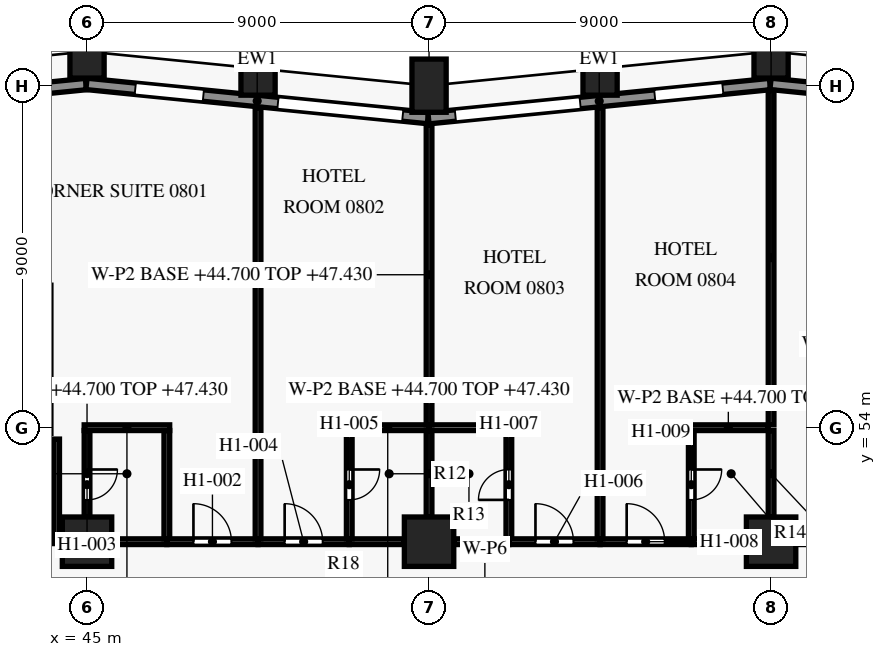
"""IFC4 building model, lengths in metres.
Left out: names, types, materials, properties, quantities, classifications, styles, units other than length and angle.
Written with IfcOpenShell. Run it as: python <this file> out.ifc"""

import sys

from ifc_helpers import new_model, si_unit, direction, frame, frame_2d, origin, origin_2d, place, context, subcontext, project, spatial, rectangle, extrude, element, fill, save


model = new_model("IFC4")
c1 = context("Model", 3, precision=1e-05, world=origin(), true_north=direction((0.0, 1.0)))
c2 = subcontext(c1, "Body", "Model", "MODEL_VIEW")
j1 = project(units=[si_unit("LENGTHUNIT", "METRE"), si_unit("PLANEANGLEUNIT", "RADIAN")], contexts=[c1])
p1 = place(None, origin())
s1 = spatial("IfcSite", under=j1, at=p1, CompositionType="ELEMENT")
p2 = place(p1, origin())
s2 = spatial("IfcBuilding", under=s1, at=p2, CompositionType="ELEMENT")
p3 = place(p2, frame((0.0, 0.0, 44.7)))
s3 = spatial("IfcBuildingStorey", under=s2, at=p3, CompositionType="ELEMENT", Elevation=44.7)
for number, where, z_axis, x_axis in (
    (1, (63.0, 63.9, 0.0), (0.0, 0.0, 1.0), (-1.0, 0.0, 0.0)),
    (2, (58.5, 63.45, 0.0), (0.0, 0.0, 1.0), (-0.995, -0.1, 0.0)),
    (3, (54.0, 63.0, 0.0), (0.0, 0.0, 1.0), (-1.0, 0.0, 0.0)),
    (4, (49.5, 63.45, 0.0), (0.0, 0.0, 1.0), (-0.995, 0.1, 0.0)),
    (5, (45.0, 63.9, 0.0), (0.0, 0.0, 1.0), (-1.0, 0.0, 0.0)),
):
    element("IfcColumn", number, at=place(p3, frame(where, z_axis=z_axis, x_axis=x_axis)), inside=s3, PredefinedType="COLUMN", context=c2, shape_type="SweptSolid", body=[
        extrude(rectangle(XDim=0.9, YDim=1.4, at=origin_2d()), origin(), (0.0, 0.0, 1.0), 3.6),
    ])
for number, where, z_axis, x_axis in (
    (6, (45.0, 51.0, 0.0), (0.0, 0.0, 1.0), (1.0, 0.0, 0.0)),
    (7, (54.0, 51.0, 0.0), (0.0, 0.0, 1.0), (1.0, 0.0, 0.0)),
    (8, (63.0, 51.0, 0.0), (0.0, 0.0, 1.0), (1.0, 0.0, 0.0)),
):
    element("IfcColumn", number, at=place(p3, frame(where, z_axis=z_axis, x_axis=x_axis)), inside=s3, PredefinedType="COLUMN", context=c2, shape_type="SweptSolid", body=[
        extrude(rectangle(XDim=1.3, YDim=1.3, at=origin_2d()), origin(), (0.0, 0.0, 1.0), 3.6),
    ])
p4 = place(p3, frame((62.985, 63.047, 0.0), z_axis=(0.0, 0.0, 1.0), x_axis=(0.995031712439, -0.099558481511, 0.0)))
e9 = element("IfcWall", 9, at=p4, inside=s3, PredefinedType="SOLIDWALL", context=c2, shape_type="SweptSolid", body=[
    extrude(rectangle(XDim=3.531, YDim=0.3, at=frame_2d((1.766, 0.0))), origin(), (0.0, 0.0, 1.0), 2.95),
])
p5 = place(p4, frame((1.291, 0.0, 0.75)))
e10 = element("IfcOpeningElement", 10, at=p5, cuts=e9, PredefinedType="OPENING", context=c2, shape_type="SweptSolid", body=[
    extrude(rectangle(XDim=1.8, YDim=1.8, at=frame_2d((0.9, 0.9))), frame((0.0, 0.16, 0.0), z_axis=(0.0, -1.0, 0.0), x_axis=(1.0, 0.0, 0.0)), (0.0, 0.0, 1.0), 0.32),
])
p6 = place(p3, frame((53.985, 62.144, 0.0), z_axis=(0.0, 0.0, 1.0), x_axis=(0.995037993253, 0.099495688264, 0.0)))
e11 = element("IfcWall", 11, at=p6, inside=s3, PredefinedType="SOLIDWALL", context=c2, shape_type="SweptSolid", body=[
    extrude(rectangle(XDim=9.03, YDim=0.3, at=frame_2d((4.515, 0.0))), origin(), (0.0, 0.0, 1.0), 2.95),
])
p7 = place(p6, frame((0.711, 0.0, 0.15)))
e12 = element("IfcOpeningElement", 12, at=p7, cuts=e11, PredefinedType="OPENING", context=c2, shape_type="SweptSolid", body=[
    extrude(rectangle(XDim=3.3, YDim=2.4, at=frame_2d((1.65, 1.2))), frame((0.0, 0.16, 0.0), z_axis=(0.0, -1.0, 0.0), x_axis=(1.0, 0.0, 0.0)), (0.0, 0.0, 1.0), 0.32),
])
p8 = place(p6, frame((5.984, 0.0, 0.75)))
e13 = element("IfcOpeningElement", 13, at=p8, cuts=e11, PredefinedType="OPENING", context=c2, shape_type="SweptSolid", body=[
    extrude(rectangle(XDim=1.8, YDim=1.8, at=frame_2d((0.9, 0.9))), frame((0.0, 0.16, 0.0), z_axis=(0.0, -1.0, 0.0), x_axis=(1.0, 0.0, 0.0)), (0.0, 0.0, 1.0), 0.32),
])
p9 = place(p3, frame((44.985, 63.047, 0.0), z_axis=(0.0, 0.0, 1.0), x_axis=(0.995035316196, -0.099522457379, 0.0)))
e14 = element("IfcWall", 14, at=p9, inside=s3, PredefinedType="SOLIDWALL", context=c2, shape_type="SweptSolid", body=[
    extrude(rectangle(XDim=9.03, YDim=0.3, at=frame_2d((4.515, 0.0))), origin(), (0.0, 0.0, 1.0), 2.95),
])
p10 = place(p9, frame((1.291, 0.0, 0.75)))
e15 = element("IfcOpeningElement", 15, at=p10, cuts=e14, PredefinedType="OPENING", context=c2, shape_type="SweptSolid", body=[
    extrude(rectangle(XDim=1.8, YDim=1.8, at=frame_2d((0.9, 0.9))), frame((0.0, 0.16, 0.0), z_axis=(0.0, -1.0, 0.0), x_axis=(1.0, 0.0, 0.0)), (0.0, 0.0, 1.0), 0.32),
])
p11 = place(p9, frame((5.064, 0.0, 0.15)))
e16 = element("IfcOpeningElement", 16, at=p11, cuts=e14, PredefinedType="OPENING", context=c2, shape_type="SweptSolid", body=[
    extrude(rectangle(XDim=3.3, YDim=2.4, at=frame_2d((1.65, 1.2))), frame((0.0, 0.16, 0.0), z_axis=(0.0, -1.0, 0.0), x_axis=(1.0, 0.0, 0.0)), (0.0, 0.0, 1.0), 0.32),
])
p12 = place(p3, frame((35.985, 62.144, 0.0), z_axis=(0.0, 0.0, 1.0), x_axis=(0.995037993253, 0.099495688264, 0.0)))
e17 = element("IfcWall", 17, at=p12, inside=s3, PredefinedType="SOLIDWALL", context=c2, shape_type="SweptSolid", body=[
    extrude(rectangle(XDim=9.03, YDim=0.3, at=frame_2d((4.515, 0.0))), origin(), (0.0, 0.0, 1.0), 2.95),
])
p13 = place(p12, frame((0.711, 0.0, 0.15)))
e18 = element("IfcOpeningElement", 18, at=p13, cuts=e17, PredefinedType="OPENING", context=c2, shape_type="SweptSolid", body=[
    extrude(rectangle(XDim=3.3, YDim=2.4, at=frame_2d((1.65, 1.2))), frame((0.0, 0.16, 0.0), z_axis=(0.0, -1.0, 0.0), x_axis=(1.0, 0.0, 0.0)), (0.0, 0.0, 1.0), 0.32),
])
p14 = place(p12, frame((5.984, 0.0, 0.75)))
e19 = element("IfcOpeningElement", 19, at=p14, cuts=e17, PredefinedType="OPENING", context=c2, shape_type="SweptSolid", body=[
    extrude(rectangle(XDim=1.8, YDim=1.8, at=frame_2d((0.9, 0.9))), frame((0.0, 0.16, 0.0), z_axis=(0.0, -1.0, 0.0), x_axis=(1.0, 0.0, 0.0)), (0.0, 0.0, 1.0), 0.32),
])
p15 = place(p3, frame((44.33, 51.0, 0.0), z_axis=(0.0, 0.0, 1.0), x_axis=(-1.0, 0.0, 0.0)))
e20 = element("IfcWall", 20, at=p15, inside=s3, PredefinedType="PARTITIONING", context=c2, shape_type="SweptSolid", body=[
    extrude(rectangle(XDim=3.83, YDim=0.1, at=frame_2d((1.915, 0.0))), origin(), (0.0, 0.0, 1.0), 2.58),
])
p16 = place(p3, frame((45.655, 51.0, 0.0), z_axis=(0.0, 0.0, 1.0), x_axis=(1.0, 0.0, 0.0)))
e21 = element("IfcWall", 21, at=p16, inside=s3, PredefinedType="PARTITIONING", context=c2, shape_type="SweptSolid", body=[
    extrude(rectangle(XDim=1.445, YDim=0.15, at=frame_2d((0.723, 0.0))), origin(), (0.0, 0.0, 1.0), 2.58),
])
p17 = place(p3, frame((47.1, 51.0, 0.0), z_axis=(0.0, 0.0, 1.0), x_axis=(1.0, 0.0, 0.0)))
e22 = element("IfcWall", 22, at=p17, inside=s3, PredefinedType="PARTITIONING", context=c2, shape_type="SweptSolid", body=[
    extrude(rectangle(XDim=2.4, YDim=0.15, at=frame_2d((1.2, 0.0))), origin(), (0.0, 0.0, 1.0), 2.58),
])
p18 = place(p17, frame((0.7, 0.0, 0.0)))
e23 = element("IfcOpeningElement", 23, at=p18, cuts=e22, PredefinedType="OPENING", context=c2, shape_type="SweptSolid", body=[
    extrude(rectangle(XDim=1.0, YDim=2.1, at=frame_2d((0.5, 1.05))), frame((0.0, 0.085, 0.0), z_axis=(0.0, -1.0, 0.0), x_axis=(1.0, 0.0, 0.0)), (0.0, 0.0, 1.0), 0.17),
])
p19 = place(p3, frame((49.5, 51.0, 0.0), z_axis=(0.0, 0.0, 1.0), x_axis=(1.0, 0.0, 0.0)))
e24 = element("IfcWall", 24, at=p19, inside=s3, PredefinedType="PARTITIONING", context=c2, shape_type="SweptSolid", body=[
    extrude(rectangle(XDim=2.4, YDim=0.15, at=frame_2d((1.2, 0.0))), origin(), (0.0, 0.0, 1.0), 2.58),
])
p20 = place(p19, frame((0.7, 0.0, 0.0)))
e25 = element("IfcOpeningElement", 25, at=p20, cuts=e24, PredefinedType="OPENING", context=c2, shape_type="SweptSolid", body=[
    extrude(rectangle(XDim=1.0, YDim=2.1, at=frame_2d((0.5, 1.05))), frame((0.0, 0.085, 0.0), z_axis=(0.0, -1.0, 0.0), x_axis=(1.0, 0.0, 0.0)), (0.0, 0.0, 1.0), 0.17),
])
for number, where, z_axis, x_axis in (
    (26, (51.9, 51.0, 0.0), (0.0, 0.0, 1.0), (1.0, 0.0, 0.0)),
    (27, (54.655, 51.0, 0.0), (0.0, 0.0, 1.0), (1.0, 0.0, 0.0)),
):
    element("IfcWall", number, at=place(p3, frame(where, z_axis=z_axis, x_axis=x_axis)), inside=s3, PredefinedType="PARTITIONING", context=c2, shape_type="SweptSolid", body=[
        extrude(rectangle(XDim=1.445, YDim=0.15, at=frame_2d((0.723, 0.0))), origin(), (0.0, 0.0, 1.0), 2.58),
    ])
p21 = place(p3, frame((56.1, 51.0, 0.0), z_axis=(0.0, 0.0, 1.0), x_axis=(1.0, 0.0, 0.0)))
e28 = element("IfcWall", 28, at=p21, inside=s3, PredefinedType="PARTITIONING", context=c2, shape_type="SweptSolid", body=[
    extrude(rectangle(XDim=2.4, YDim=0.15, at=frame_2d((1.2, 0.0))), origin(), (0.0, 0.0, 1.0), 2.58),
])
p22 = place(p21, frame((0.7, 0.0, 0.0)))
e29 = element("IfcOpeningElement", 29, at=p22, cuts=e28, PredefinedType="OPENING", context=c2, shape_type="SweptSolid", body=[
    extrude(rectangle(XDim=1.0, YDim=2.1, at=frame_2d((0.5, 1.05))), frame((0.0, 0.085, 0.0), z_axis=(0.0, -1.0, 0.0), x_axis=(1.0, 0.0, 0.0)), (0.0, 0.0, 1.0), 0.17),
])
p23 = place(p3, frame((58.5, 51.0, 0.0), z_axis=(0.0, 0.0, 1.0), x_axis=(1.0, 0.0, 0.0)))
e30 = element("IfcWall", 30, at=p23, inside=s3, PredefinedType="PARTITIONING", context=c2, shape_type="SweptSolid", body=[
    extrude(rectangle(XDim=2.4, YDim=0.15, at=frame_2d((1.2, 0.0))), origin(), (0.0, 0.0, 1.0), 2.58),
])
p24 = place(p23, frame((0.7, 0.0, 0.0)))
e31 = element("IfcOpeningElement", 31, at=p24, cuts=e30, PredefinedType="OPENING", context=c2, shape_type="SweptSolid", body=[
    extrude(rectangle(XDim=1.0, YDim=2.1, at=frame_2d((0.5, 1.05))), frame((0.0, 0.085, 0.0), z_axis=(0.0, -1.0, 0.0), x_axis=(1.0, 0.0, 0.0)), (0.0, 0.0, 1.0), 0.17),
])
p25 = place(p3, frame((60.9, 51.0, 0.0), z_axis=(0.0, 0.0, 1.0), x_axis=(1.0, 0.0, 0.0)))
e32 = element("IfcWall", 32, at=p25, inside=s3, PredefinedType="PARTITIONING", context=c2, shape_type="SweptSolid", body=[
    extrude(rectangle(XDim=1.445, YDim=0.15, at=frame_2d((0.723, 0.0))), origin(), (0.0, 0.0, 1.0), 2.58),
])
p26 = place(p3, frame((63.655, 51.0, 0.0), z_axis=(0.0, 0.0, 1.0), x_axis=(1.0, 0.0, 0.0)))
e33 = element("IfcWall", 33, at=p26, inside=s3, PredefinedType="PARTITIONING", context=c2, shape_type="SweptSolid", body=[
    extrude(rectangle(XDim=1.22, YDim=0.15, at=frame_2d((0.61, 0.0))), origin(), (0.0, 0.0, 1.0), 2.58),
])
p27 = place(p3, frame((47.1, 51.075, 0.0), z_axis=(0.0, 0.0, 1.0), x_axis=(0.0, 1.0, 0.0)))
e34 = element("IfcWall", 34, at=p27, inside=s3, PredefinedType="PARTITIONING", context=c2, shape_type="SweptSolid", body=[
    extrude(rectangle(XDim=2.85, YDim=0.15, at=frame_2d((1.425, 0.0))), origin(), (0.0, 0.0, 1.0), 2.58),
])
p28 = place(p3, frame((56.1, 51.075, 0.0), z_axis=(0.0, 0.0, 1.0), x_axis=(0.0, 1.0, 0.0)))
e35 = element("IfcWall", 35, at=p28, inside=s3, PredefinedType="PARTITIONING", context=c2, shape_type="SweptSolid", body=[
    extrude(rectangle(XDim=2.85, YDim=0.15, at=frame_2d((1.425, 0.0))), origin(), (0.0, 0.0, 1.0), 2.58),
])
p29 = place(p28, frame((1.025, 0.0, 0.0)))
e36 = element("IfcOpeningElement", 36, at=p29, cuts=e35, PredefinedType="OPENING", context=c2, shape_type="SweptSolid", body=[
    extrude(rectangle(XDim=0.8, YDim=2.1, at=frame_2d((0.4, 1.05))), frame((0.0, 0.085, 0.0), z_axis=(0.0, -1.0, 0.0), x_axis=(1.0, 0.0, 0.0)), (0.0, 0.0, 1.0), 0.17),
])
p30 = place(p3, frame((44.2, 53.7, 0.0), z_axis=(0.0, 0.0, 1.0), x_axis=(0.0, -1.0, 0.0)))
e37 = element("IfcWall", 37, at=p30, inside=s3, PredefinedType="PARTITIONING", context=c2, shape_type="SweptSolid", body=[
    extrude(rectangle(XDim=2.625, YDim=0.15, at=frame_2d((1.312, 0.0))), origin(), (0.0, 0.0, 1.0), 2.58),
])
p31 = place(p3, frame((45.0, 53.925, 0.0), z_axis=(0.0, 0.0, 1.0), x_axis=(0.0, -1.0, 0.0)))
e38 = element("IfcWall", 38, at=p31, inside=s3, PredefinedType="PARTITIONING", context=c2, shape_type="SweptSolid", body=[
    extrude(rectangle(XDim=2.27, YDim=0.15, at=frame_2d((1.135, 0.0))), origin(), (0.0, 0.0, 1.0), 2.73),
])
p32 = place(p31, frame((1.025, 0.0, 0.0)))
e39 = element("IfcOpeningElement", 39, at=p32, cuts=e38, PredefinedType="OPENING", context=c2, shape_type="SweptSolid", body=[
    extrude(rectangle(XDim=0.8, YDim=2.1, at=frame_2d((0.4, 1.05))), frame((0.0, 0.085, 0.0), z_axis=(0.0, -1.0, 0.0), x_axis=(1.0, 0.0, 0.0)), (0.0, 0.0, 1.0), 0.17),
])
p33 = place(p3, frame((51.9, 53.925, 0.0), z_axis=(0.0, 0.0, 1.0), x_axis=(0.0, -1.0, 0.0)))
e40 = element("IfcWall", 40, at=p33, inside=s3, PredefinedType="PARTITIONING", context=c2, shape_type="SweptSolid", body=[
    extrude(rectangle(XDim=2.85, YDim=0.15, at=frame_2d((1.425, 0.0))), origin(), (0.0, 0.0, 1.0), 2.58),
])
p34 = place(p33, frame((1.025, 0.0, 0.0)))
e41 = element("IfcOpeningElement", 41, at=p34, cuts=e40, PredefinedType="OPENING", context=c2, shape_type="SweptSolid", body=[
    extrude(rectangle(XDim=0.8, YDim=2.1, at=frame_2d((0.4, 1.05))), frame((0.0, 0.085, 0.0), z_axis=(0.0, -1.0, 0.0), x_axis=(1.0, 0.0, 0.0)), (0.0, 0.0, 1.0), 0.17),
])
p35 = place(p3, frame((54.0, 53.925, 0.0), z_axis=(0.0, 0.0, 1.0), x_axis=(0.0, -1.0, 0.0)))
e42 = element("IfcWall", 42, at=p35, inside=s3, PredefinedType="PARTITIONING", context=c2, shape_type="SweptSolid", body=[
    extrude(rectangle(XDim=2.27, YDim=0.15, at=frame_2d((1.135, 0.0))), origin(), (0.0, 0.0, 1.0), 2.73),
])
p36 = place(p3, frame((60.9, 53.925, 0.0), z_axis=(0.0, 0.0, 1.0), x_axis=(0.0, -1.0, 0.0)))
e43 = element("IfcWall", 43, at=p36, inside=s3, PredefinedType="PARTITIONING", context=c2, shape_type="SweptSolid", body=[
    extrude(rectangle(XDim=2.85, YDim=0.15, at=frame_2d((1.425, 0.0))), origin(), (0.0, 0.0, 1.0), 2.58),
])
p37 = place(p36, frame((1.025, 0.0, 0.0)))
e44 = element("IfcOpeningElement", 44, at=p37, cuts=e43, PredefinedType="OPENING", context=c2, shape_type="SweptSolid", body=[
    extrude(rectangle(XDim=0.8, YDim=2.1, at=frame_2d((0.4, 1.05))), frame((0.0, 0.085, 0.0), z_axis=(0.0, -1.0, 0.0), x_axis=(1.0, 0.0, 0.0)), (0.0, 0.0, 1.0), 0.17),
])
p38 = place(p3, frame((63.0, 53.925, 0.0), z_axis=(0.0, 0.0, 1.0), x_axis=(0.0, -1.0, 0.0)))
e45 = element("IfcWall", 45, at=p38, inside=s3, PredefinedType="PARTITIONING", context=c2, shape_type="SweptSolid", body=[
    extrude(rectangle(XDim=2.27, YDim=0.15, at=frame_2d((1.135, 0.0))), origin(), (0.0, 0.0, 1.0), 2.73),
])
p39 = place(p3, frame((47.175, 54.0, 0.0), z_axis=(0.0, 0.0, 1.0), x_axis=(-1.0, 0.0, 0.0)))
e46 = element("IfcWall", 46, at=p39, inside=s3, PredefinedType="PARTITIONING", context=c2, shape_type="SweptSolid", body=[
    extrude(rectangle(XDim=2.25, YDim=0.15, at=frame_2d((1.125, 0.0))), origin(), (0.0, 0.0, 1.0), 2.73),
])
for number, where, z_axis, x_axis in (
    (47, (54.0, 54.0, 0.0), (0.0, 0.0, 1.0), (-1.0, 0.0, 0.0)),
    (48, (56.175, 54.0, 0.0), (0.0, 0.0, 1.0), (-1.0, 0.0, 0.0)),
):
    element("IfcWall", number, at=place(p3, frame(where, z_axis=z_axis, x_axis=x_axis)), inside=s3, PredefinedType="PARTITIONING", context=c2, shape_type="SweptSolid", body=[
        extrude(rectangle(XDim=2.175, YDim=0.15, at=frame_2d((1.087, 0.0))), origin(), (0.0, 0.0, 1.0), 2.73),
    ])
p40 = place(p3, frame((62.925, 54.0, 0.0), z_axis=(0.0, 0.0, 1.0), x_axis=(-1.0, 0.0, 0.0)))
e49 = element("IfcWall", 49, at=p40, inside=s3, PredefinedType="PARTITIONING", context=c2, shape_type="SweptSolid", body=[
    extrude(rectangle(XDim=2.1, YDim=0.15, at=frame_2d((1.05, 0.0))), origin(), (0.0, 0.0, 1.0), 2.73),
])
p41 = place(p3, frame((54.0, 61.975, 0.0), z_axis=(0.0, 0.0, 1.0), x_axis=(0.0, -1.0, 0.0)))
e50 = element("IfcWall", 50, at=p41, inside=s3, PredefinedType="PARTITIONING", context=c2, shape_type="SweptSolid", body=[
    extrude(rectangle(XDim=7.9, YDim=0.15, at=frame_2d((3.95, 0.0))), origin(), (0.0, 0.0, 1.0), 2.73),
])
for number, where, z_axis, x_axis in (
    (51, (49.5, 62.425, 0.0), (0.0, 0.0, 1.0), (0.0, -1.0, 0.0)),
    (52, (58.5, 62.425, 0.0), (0.0, 0.0, 1.0), (0.0, -1.0, 0.0)),
):
    element("IfcWall", number, at=place(p3, frame(where, z_axis=z_axis, x_axis=x_axis)), inside=s3, PredefinedType="PARTITIONING", context=c2, shape_type="SweptSolid", body=[
        extrude(rectangle(XDim=11.35, YDim=0.15, at=frame_2d((5.675, 0.0))), origin(), (0.0, 0.0, 1.0), 2.58),
    ])
p42 = place(p3, frame((63.0, 62.875, 0.0), z_axis=(0.0, 0.0, 1.0), x_axis=(0.0, -1.0, 0.0)))
e53 = element("IfcWall", 53, at=p42, inside=s3, PredefinedType="PARTITIONING", context=c2, shape_type="SweptSolid", body=[
    extrude(rectangle(XDim=8.8, YDim=0.15, at=frame_2d((4.4, 0.0))), origin(), (0.0, 0.0, 1.0), 2.73),
])
p43 = place(p7, origin())
e54 = element("IfcWindow", 54, at=p43, inside=s3, PartitioningType="SINGLE_PANEL", PredefinedType="WINDOW", context=c2, shape_type="SweptSolid", body=[
    extrude(rectangle(XDim=3.3, YDim=2.4, at=frame_2d((1.65, 1.2))), frame((0.0, 0.03, 0.0), z_axis=(0.0, -1.0, 0.0), x_axis=(1.0, 0.0, 0.0)), (0.0, 0.0, 1.0), 0.06),
])
fill(e12, e54)
p44 = place(p8, origin())
e55 = element("IfcWindow", 55, at=p44, inside=s3, PartitioningType="SINGLE_PANEL", PredefinedType="WINDOW", context=c2, shape_type="SweptSolid", body=[
    extrude(rectangle(XDim=1.8, YDim=1.8, at=frame_2d((0.9, 0.9))), frame((0.0, 0.03, 0.0), z_axis=(0.0, -1.0, 0.0), x_axis=(1.0, 0.0, 0.0)), (0.0, 0.0, 1.0), 0.06),
])
fill(e13, e55)
p45 = place(p10, origin())
e56 = element("IfcWindow", 56, at=p45, inside=s3, PartitioningType="SINGLE_PANEL", PredefinedType="WINDOW", context=c2, shape_type="SweptSolid", body=[
    extrude(rectangle(XDim=1.8, YDim=1.8, at=frame_2d((0.9, 0.9))), frame((0.0, 0.03, 0.0), z_axis=(0.0, -1.0, 0.0), x_axis=(1.0, 0.0, 0.0)), (0.0, 0.0, 1.0), 0.06),
])
fill(e15, e56)
p46 = place(p11, origin())
e57 = element("IfcWindow", 57, at=p46, inside=s3, PartitioningType="SINGLE_PANEL", PredefinedType="WINDOW", context=c2, shape_type="SweptSolid", body=[
    extrude(rectangle(XDim=3.3, YDim=2.4, at=frame_2d((1.65, 1.2))), frame((0.0, 0.03, 0.0), z_axis=(0.0, -1.0, 0.0), x_axis=(1.0, 0.0, 0.0)), (0.0, 0.0, 1.0), 0.06),
])
fill(e16, e57)
p47 = place(p18, origin())
e58 = element("IfcDoor", 58, at=p47, inside=s3, OperationType="SINGLE_SWING_LEFT", PredefinedType="DOOR", context=c2, shape_type="SweptSolid", body=[
    extrude(rectangle(XDim=1.0, YDim=2.1, at=frame_2d((0.5, 1.05))), frame((0.0, 0.025, 0.0), z_axis=(0.0, -1.0, 0.0), x_axis=(1.0, 0.0, 0.0)), (0.0, 0.0, 1.0), 0.05),
])
fill(e23, e58)
p48 = place(p32, origin())
e59 = element("IfcDoor", 59, at=p48, inside=s3, OperationType="SINGLE_SWING_RIGHT", PredefinedType="DOOR", context=c2, shape_type="SweptSolid", body=[
    extrude(rectangle(XDim=0.8, YDim=2.1, at=frame_2d((0.4, 1.05))), frame((0.0, 0.025, 0.0), z_axis=(0.0, -1.0, 0.0), x_axis=(1.0, 0.0, 0.0)), (0.0, 0.0, 1.0), 0.05),
])
fill(e39, e59)
p49 = place(p20, origin())
e60 = element("IfcDoor", 60, at=p49, inside=s3, OperationType="SINGLE_SWING_LEFT", PredefinedType="DOOR", context=c2, shape_type="SweptSolid", body=[
    extrude(rectangle(XDim=1.0, YDim=2.1, at=frame_2d((0.5, 1.05))), frame((0.0, 0.025, 0.0), z_axis=(0.0, -1.0, 0.0), x_axis=(1.0, 0.0, 0.0)), (0.0, 0.0, 1.0), 0.05),
])
fill(e25, e60)
p50 = place(p34, origin())
e61 = element("IfcDoor", 61, at=p50, inside=s3, OperationType="SINGLE_SWING_LEFT", PredefinedType="DOOR", context=c2, shape_type="SweptSolid", body=[
    extrude(rectangle(XDim=0.8, YDim=2.1, at=frame_2d((0.4, 1.05))), frame((0.0, 0.025, 0.0), z_axis=(0.0, -1.0, 0.0), x_axis=(1.0, 0.0, 0.0)), (0.0, 0.0, 1.0), 0.05),
])
fill(e41, e61)
p51 = place(p22, origin())
e62 = element("IfcDoor", 62, at=p51, inside=s3, OperationType="SINGLE_SWING_LEFT", PredefinedType="DOOR", context=c2, shape_type="SweptSolid", body=[
    extrude(rectangle(XDim=1.0, YDim=2.1, at=frame_2d((0.5, 1.05))), frame((0.0, 0.025, 0.0), z_axis=(0.0, -1.0, 0.0), x_axis=(1.0, 0.0, 0.0)), (0.0, 0.0, 1.0), 0.05),
])
fill(e29, e62)
p52 = place(p29, origin())
e63 = element("IfcDoor", 63, at=p52, inside=s3, OperationType="SINGLE_SWING_LEFT", PredefinedType="DOOR", context=c2, shape_type="SweptSolid", body=[
    extrude(rectangle(XDim=0.8, YDim=2.1, at=frame_2d((0.4, 1.05))), frame((0.0, 0.025, 0.0), z_axis=(0.0, -1.0, 0.0), x_axis=(1.0, 0.0, 0.0)), (0.0, 0.0, 1.0), 0.05),
])
fill(e36, e63)
p53 = place(p24, origin())
e64 = element("IfcDoor", 64, at=p53, inside=s3, OperationType="SINGLE_SWING_LEFT", PredefinedType="DOOR", context=c2, shape_type="SweptSolid", body=[
    extrude(rectangle(XDim=1.0, YDim=2.1, at=frame_2d((0.5, 1.05))), frame((0.0, 0.025, 0.0), z_axis=(0.0, -1.0, 0.0), x_axis=(1.0, 0.0, 0.0)), (0.0, 0.0, 1.0), 0.05),
])
fill(e31, e64)
p54 = place(p37, origin())
e65 = element("IfcDoor", 65, at=p54, inside=s3, OperationType="SINGLE_SWING_LEFT", PredefinedType="DOOR", context=c2, shape_type="SweptSolid", body=[
    extrude(rectangle(XDim=0.8, YDim=2.1, at=frame_2d((0.4, 1.05))), frame((0.0, 0.025, 0.0), z_axis=(0.0, -1.0, 0.0), x_axis=(1.0, 0.0, 0.0)), (0.0, 0.0, 1.0), 0.05),
])
fill(e44, e65)
save(model, sys.argv[1])
